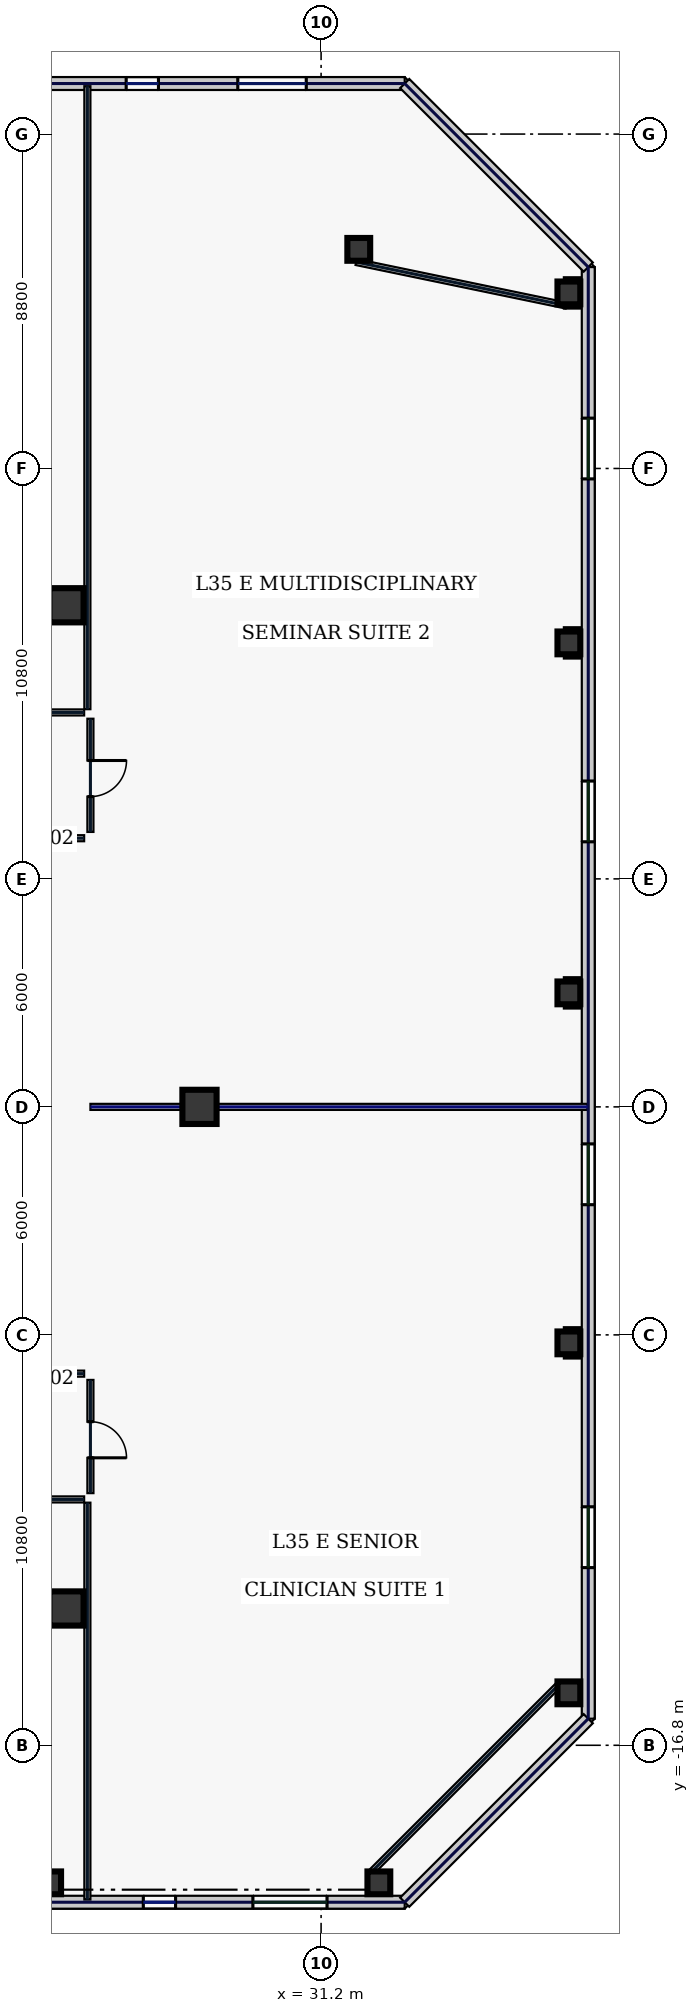
"""IFC4 building model, lengths in metres.
Left out: names, types, materials, properties, quantities, classifications, styles, units other than length and angle.
Written with IfcOpenShell. Run it as: python <this file> out.ifc"""

import sys

from ifc_helpers import new_model, si_unit, direction, frame, frame_2d, origin, origin_2d, place, context, subcontext, project, spatial, rectangle, hollow_rectangle, extrude, element, fill, save


model = new_model("IFC4")
c1 = context("Model", 3, precision=1e-05, world=origin(), true_north=direction((0.0, 1.0)))
c2 = subcontext(c1, "Body", "Model", "MODEL_VIEW")
j1 = project(units=[si_unit("LENGTHUNIT", "METRE"), si_unit("PLANEANGLEUNIT", "RADIAN")], contexts=[c1])
p1 = place(None, origin())
s1 = spatial("IfcSite", under=j1, at=p1, CompositionType="ELEMENT")
p2 = place(p1, origin())
s2 = spatial("IfcBuilding", under=s1, at=p2, CompositionType="ELEMENT")
p3 = place(p2, frame((0.0, 0.0, 156.2)))
s3 = spatial("IfcBuildingStorey", under=s2, at=p3, CompositionType="ELEMENT", Elevation=156.2)
for number, where, z_axis, x_axis in (
    (1, (24.5, -13.2, 0.0), (0.0, 0.0, 1.0), (1.0, 0.0, 0.0)),
    (2, (24.5, 13.2, 0.0), (0.0, 0.0, 1.0), (1.0, 0.0, 0.0)),
    (3, (28.0, 0.0, 0.0), (0.0, 0.0, 1.0), (1.0, 0.0, 0.0)),
):
    element("IfcColumn", number, at=place(p3, frame(where, z_axis=z_axis, x_axis=x_axis)), inside=s3, PredefinedType="COLUMN", context=c2, shape_type="SweptSolid", body=[
        extrude(hollow_rectangle(XDim=0.9, YDim=0.9, WallThickness=0.04, at=origin_2d()), origin(), (0.0, 0.0, 1.0), 3.74),
    ])
for number, where, z_axis, x_axis in (
    (4, (24.057, -20.42, 0.0), (0.0, 0.0, 1.0), (1.0, 0.0, 0.0)),
    (5, (32.72, -20.42, 0.0), (0.0, 0.0, 1.0), (1.0, 0.0, 0.0)),
    (6, (32.191, 22.566, 0.0), (0.0, 0.0, 1.0), (1.0, 0.0, 0.0)),
    (7, (37.72, -15.42, 0.0), (0.0, 0.0, 1.0), (1.0, 0.0, 0.0)),
    (8, (37.72, -6.21, 0.0), (0.0, 0.0, 1.0), (1.0, 0.0, 0.0)),
    (9, (37.72, 3.0, 0.0), (0.0, 0.0, 1.0), (1.0, 0.0, 0.0)),
    (10, (37.72, 12.21, 0.0), (0.0, 0.0, 1.0), (1.0, 0.0, 0.0)),
    (11, (37.72, 21.42, 0.0), (0.0, 0.0, 1.0), (1.0, 0.0, 0.0)),
):
    element("IfcColumn", number, at=place(p3, frame(where, z_axis=z_axis, x_axis=x_axis)), inside=s3, PredefinedType="COLUMN", context=c2, shape_type="SweptSolid", body=[
        extrude(hollow_rectangle(XDim=0.6, YDim=0.6, WallThickness=0.028, at=origin_2d()), origin(), (0.0, 0.0, 1.0), 3.74),
    ])
p4 = place(p3, frame((13.463, -20.93, 0.0), z_axis=(0.0, 0.0, 1.0), x_axis=(1.0, 0.0, 0.0)))
e12 = element("IfcWall", 12, at=p4, inside=s3, PredefinedType="STANDARD", context=c2, shape_type="SweptSolid", body=[
    extrude(rectangle(XDim=19.937, YDim=0.34, at=frame_2d((9.969, 0.0))), origin(), (0.0, 0.0, 1.0), 3.74),
])
p5 = place(p4, frame((3.295, 0.0, 0.8)))
e13 = element("IfcOpeningElement", 13, at=p5, cuts=e12, PredefinedType="OPENING", context=c2, shape_type="SweptSolid", body=[
    extrude(rectangle(XDim=1.95, YDim=2.1, at=frame_2d((0.975, 1.05))), frame((0.0, 0.18, 0.0), z_axis=(0.0, -1.0, 0.0), x_axis=(1.0, 0.0, 0.0)), (0.0, 0.0, 1.0), 0.36),
])
p6 = place(p4, frame((8.38, 0.0, 0.8)))
e14 = element("IfcOpeningElement", 14, at=p6, cuts=e12, PredefinedType="OPENING", context=c2, shape_type="SweptSolid", body=[
    extrude(rectangle(XDim=0.85, YDim=1.85, at=frame_2d((0.425, 0.925))), frame((0.0, 0.18, 0.0), z_axis=(0.0, -1.0, 0.0), x_axis=(1.0, 0.0, 0.0)), (0.0, 0.0, 1.0), 0.36),
])
p7 = place(p4, frame((13.058, 0.0, 0.8)))
e15 = element("IfcOpeningElement", 15, at=p7, cuts=e12, PredefinedType="OPENING", context=c2, shape_type="SweptSolid", body=[
    extrude(rectangle(XDim=0.85, YDim=1.85, at=frame_2d((0.425, 0.925))), frame((0.0, 0.18, 0.0), z_axis=(0.0, -1.0, 0.0), x_axis=(1.0, 0.0, 0.0)), (0.0, 0.0, 1.0), 0.36),
])
p8 = place(p4, frame((15.943, 0.0, 0.8)))
e16 = element("IfcOpeningElement", 16, at=p8, cuts=e12, PredefinedType="OPENING", context=c2, shape_type="SweptSolid", body=[
    extrude(rectangle(XDim=1.95, YDim=2.1, at=frame_2d((0.975, 1.05))), frame((0.0, 0.18, 0.0), z_axis=(0.0, -1.0, 0.0), x_axis=(1.0, 0.0, 0.0)), (0.0, 0.0, 1.0), 0.36),
])
p9 = place(p3, frame((33.4, 26.93, 0.0), z_axis=(0.0, 0.0, 1.0), x_axis=(-1.0, 0.0, 0.0)))
e17 = element("IfcWall", 17, at=p9, inside=s3, PredefinedType="STANDARD", context=c2, shape_type="SweptSolid", body=[
    extrude(rectangle(XDim=20.09, YDim=0.34, at=frame_2d((10.045, 0.0))), origin(), (0.0, 0.0, 1.0), 3.74),
])
p10 = place(p9, frame((15.005, 0.0, 0.7)))
e18 = element("IfcOpeningElement", 18, at=p10, cuts=e17, PredefinedType="OPENING", context=c2, shape_type="SweptSolid", body=[
    extrude(rectangle(XDim=1.8, YDim=2.2, at=frame_2d((0.9, 1.1))), frame((0.0, 0.18, 0.0), z_axis=(0.0, -1.0, 0.0), x_axis=(1.0, 0.0, 0.0)), (0.0, 0.0, 1.0), 0.36),
])
p11 = place(p9, frame((11.071, 0.0, 0.7)))
e19 = element("IfcOpeningElement", 19, at=p11, cuts=e17, PredefinedType="OPENING", context=c2, shape_type="SweptSolid", body=[
    extrude(rectangle(XDim=0.85, YDim=1.85, at=frame_2d((0.425, 0.925))), frame((0.0, 0.18, 0.0), z_axis=(0.0, -1.0, 0.0), x_axis=(1.0, 0.0, 0.0)), (0.0, 0.0, 1.0), 0.36),
])
p12 = place(p9, frame((6.48, 0.0, 0.7)))
e20 = element("IfcOpeningElement", 20, at=p12, cuts=e17, PredefinedType="OPENING", context=c2, shape_type="SweptSolid", body=[
    extrude(rectangle(XDim=0.85, YDim=1.85, at=frame_2d((0.425, 0.925))), frame((0.0, 0.18, 0.0), z_axis=(0.0, -1.0, 0.0), x_axis=(1.0, 0.0, 0.0)), (0.0, 0.0, 1.0), 0.36),
])
p13 = place(p9, frame((2.591, 0.0, 0.7)))
e21 = element("IfcOpeningElement", 21, at=p13, cuts=e17, PredefinedType="OPENING", context=c2, shape_type="SweptSolid", body=[
    extrude(rectangle(XDim=1.8, YDim=2.2, at=frame_2d((0.9, 1.1))), frame((0.0, 0.18, 0.0), z_axis=(0.0, -1.0, 0.0), x_axis=(1.0, 0.0, 0.0)), (0.0, 0.0, 1.0), 0.36),
])
p14 = place(p3, frame((38.23, -16.1, 0.0), z_axis=(0.0, 0.0, 1.0), x_axis=(0.0, 1.0, 0.0)))
e22 = element("IfcWall", 22, at=p14, inside=s3, PredefinedType="STANDARD", context=c2, shape_type="SweptSolid", body=[
    extrude(rectangle(XDim=38.2, YDim=0.34, at=frame_2d((19.1, 0.0))), origin(), (0.0, 0.0, 1.0), 3.74),
])
p15 = place(p14, frame((3.975, 0.0, 0.58)))
e23 = element("IfcOpeningElement", 23, at=p15, cuts=e22, PredefinedType="OPENING", context=c2, shape_type="SweptSolid", body=[
    extrude(rectangle(XDim=1.6, YDim=2.3, at=frame_2d((0.8, 1.15))), frame((0.0, 0.18, 0.0), z_axis=(0.0, -1.0, 0.0), x_axis=(1.0, 0.0, 0.0)), (0.0, 0.0, 1.0), 0.36),
])
p16 = place(p14, frame((13.525, 0.0, 0.58)))
e24 = element("IfcOpeningElement", 24, at=p16, cuts=e22, PredefinedType="OPENING", context=c2, shape_type="SweptSolid", body=[
    extrude(rectangle(XDim=1.6, YDim=2.3, at=frame_2d((0.8, 1.15))), frame((0.0, 0.18, 0.0), z_axis=(0.0, -1.0, 0.0), x_axis=(1.0, 0.0, 0.0)), (0.0, 0.0, 1.0), 0.36),
])
p17 = place(p14, frame((23.075, 0.0, 0.58)))
e25 = element("IfcOpeningElement", 25, at=p17, cuts=e22, PredefinedType="OPENING", context=c2, shape_type="SweptSolid", body=[
    extrude(rectangle(XDim=1.6, YDim=2.3, at=frame_2d((0.8, 1.15))), frame((0.0, 0.18, 0.0), z_axis=(0.0, -1.0, 0.0), x_axis=(1.0, 0.0, 0.0)), (0.0, 0.0, 1.0), 0.36),
])
p18 = place(p14, frame((32.625, 0.0, 0.58)))
e26 = element("IfcOpeningElement", 26, at=p18, cuts=e22, PredefinedType="OPENING", context=c2, shape_type="SweptSolid", body=[
    extrude(rectangle(XDim=1.6, YDim=2.3, at=frame_2d((0.8, 1.15))), frame((0.0, 0.18, 0.0), z_axis=(0.0, -1.0, 0.0), x_axis=(1.0, 0.0, 0.0)), (0.0, 0.0, 1.0), 0.36),
])
for number, where, z_axis, x_axis in (
    (27, (33.4, -20.93, 0.0), (0.0, 0.0, 1.0), (0.707, 0.707, 0.0)),
    (28, (38.23, 22.1, 0.0), (0.0, 0.0, 1.0), (-0.707, 0.707, 0.0)),
):
    element("IfcWall", number, at=place(p3, frame(where, z_axis=z_axis, x_axis=x_axis)), inside=s3, PredefinedType="STANDARD", context=c2, shape_type="SweptSolid", body=[
        extrude(rectangle(XDim=6.831, YDim=0.34, at=frame_2d((3.415, 0.0))), origin(), (0.0, 0.0, 1.0), 3.74),
    ])
p19 = place(p3, frame((32.479, -20.18, 0.0), z_axis=(0.0, 0.0, 1.0), x_axis=(0.707106781187, 0.707106781187, 0.0)))
e29 = element("IfcWall", 29, at=p19, inside=s3, PredefinedType="PARTITIONING", context=c2, shape_type="SweptSolid", body=[
    extrude(rectangle(XDim=7.071, YDim=0.16, at=frame_2d((3.536, 0.0))), origin(), (0.0, 0.0, 1.0), 3.74),
])
p20 = place(p3, frame((37.651, 21.087, 0.0), z_axis=(0.0, 0.0, 1.0), x_axis=(-0.979184618318, 0.202971631636, 0.0)))
e30 = element("IfcWall", 30, at=p20, inside=s3, PredefinedType="PARTITIONING", context=c2, shape_type="SweptSolid", body=[
    extrude(rectangle(XDim=5.646, YDim=0.16, at=frame_2d((2.823, 0.0))), origin(), (0.0, 0.0, 1.0), 3.74),
])
p21 = place(p3, frame((-24.965, 10.38, 0.0), z_axis=(0.0, 0.0, 1.0), x_axis=(1.0, 0.0, 0.0)))
e31 = element("IfcWall", 31, at=p21, inside=s3, PredefinedType="PARTITIONING", context=c2, shape_type="SweptSolid", body=[
    extrude(rectangle(XDim=49.93, YDim=0.16, at=frame_2d((24.965, 0.0))), origin(), (0.0, 0.0, 1.0), 3.74),
])
p22 = place(p21, frame((2.406, 0.0, 0.0)))
e32 = element("IfcOpeningElement", 32, at=p22, cuts=e31, PredefinedType="OPENING", context=c2, shape_type="SweptSolid", body=[
    extrude(rectangle(XDim=1.05, YDim=2.2, at=frame_2d((0.525, 1.1))), frame((0.0, 0.09, 0.0), z_axis=(0.0, -1.0, 0.0), x_axis=(1.0, 0.0, 0.0)), (0.0, 0.0, 1.0), 0.18),
])
p23 = place(p21, frame((7.137, 0.0, 0.0)))
e33 = element("IfcOpeningElement", 33, at=p23, cuts=e31, PredefinedType="OPENING", context=c2, shape_type="SweptSolid", body=[
    extrude(rectangle(XDim=0.95, YDim=2.2, at=frame_2d((0.475, 1.1))), frame((0.0, 0.09, 0.0), z_axis=(0.0, -1.0, 0.0), x_axis=(1.0, 0.0, 0.0)), (0.0, 0.0, 1.0), 0.18),
])
p24 = place(p21, frame((17.18, 0.0, 0.0)))
e34 = element("IfcOpeningElement", 34, at=p24, cuts=e31, PredefinedType="OPENING", context=c2, shape_type="SweptSolid", body=[
    extrude(rectangle(XDim=0.95, YDim=2.2, at=frame_2d((0.475, 1.1))), frame((0.0, 0.09, 0.0), z_axis=(0.0, -1.0, 0.0), x_axis=(1.0, 0.0, 0.0)), (0.0, 0.0, 1.0), 0.18),
])
p25 = place(p21, frame((32.34, 0.0, 0.0)))
e35 = element("IfcOpeningElement", 35, at=p25, cuts=e31, PredefinedType="OPENING", context=c2, shape_type="SweptSolid", body=[
    extrude(rectangle(XDim=0.95, YDim=2.2, at=frame_2d((0.475, 1.1))), frame((0.0, 0.09, 0.0), z_axis=(0.0, -1.0, 0.0), x_axis=(1.0, 0.0, 0.0)), (0.0, 0.0, 1.0), 0.18),
])
p26 = place(p21, frame((42.403, 0.0, 0.0)))
e36 = element("IfcOpeningElement", 36, at=p26, cuts=e31, PredefinedType="OPENING", context=c2, shape_type="SweptSolid", body=[
    extrude(rectangle(XDim=0.95, YDim=2.2, at=frame_2d((0.475, 1.1))), frame((0.0, 0.09, 0.0), z_axis=(0.0, -1.0, 0.0), x_axis=(1.0, 0.0, 0.0)), (0.0, 0.0, 1.0), 0.18),
])
p27 = place(p21, frame((47.173, 0.0, 0.0)))
e37 = element("IfcOpeningElement", 37, at=p27, cuts=e31, PredefinedType="OPENING", context=c2, shape_type="SweptSolid", body=[
    extrude(rectangle(XDim=1.05, YDim=2.2, at=frame_2d((0.525, 1.1))), frame((0.0, 0.09, 0.0), z_axis=(0.0, -1.0, 0.0), x_axis=(1.0, 0.0, 0.0)), (0.0, 0.0, 1.0), 0.18),
])
p28 = place(p3, frame((25.13, 10.215, 0.0), z_axis=(0.0, 0.0, 1.0), x_axis=(0.0, -1.0, 0.0)))
e38 = element("IfcWall", 38, at=p28, inside=s3, PredefinedType="PARTITIONING", context=c2, shape_type="SweptSolid", body=[
    extrude(rectangle(XDim=2.98, YDim=0.16, at=frame_2d((1.49, 0.0))), origin(), (0.0, 0.0, 1.0), 3.74),
])
p29 = place(p28, frame((1.1, 0.0, 0.0)))
e39 = element("IfcOpeningElement", 39, at=p29, cuts=e38, PredefinedType="OPENING", context=c2, shape_type="SweptSolid", body=[
    extrude(rectangle(XDim=0.95, YDim=2.2, at=frame_2d((0.475, 1.1))), frame((0.0, 0.09, 0.0), z_axis=(0.0, -1.0, 0.0), x_axis=(1.0, 0.0, 0.0)), (0.0, 0.0, 1.0), 0.18),
])
for number, where, z_axis, x_axis in (
    (40, (24.965, 7.07, 0.0), (0.0, 0.0, 1.0), (-1.0, 0.0, 0.0)),
    (41, (10.715, -7.02, 0.0), (0.0, 0.0, 1.0), (1.0, 0.0, 0.0)),
):
    element("IfcWall", number, at=place(p3, frame(where, z_axis=z_axis, x_axis=x_axis)), inside=s3, PredefinedType="PARTITIONING", context=c2, shape_type="SweptSolid", body=[
        extrude(rectangle(XDim=14.25, YDim=0.16, at=frame_2d((7.125, 0.0))), origin(), (0.0, 0.0, 1.0), 3.74),
    ])
p30 = place(p3, frame((25.13, -7.185, 0.0), z_axis=(0.0, 0.0, 1.0), x_axis=(0.0, -1.0, 0.0)))
e42 = element("IfcWall", 42, at=p30, inside=s3, PredefinedType="PARTITIONING", context=c2, shape_type="SweptSolid", body=[
    extrude(rectangle(XDim=2.98, YDim=0.16, at=frame_2d((1.49, 0.0))), origin(), (0.0, 0.0, 1.0), 3.74),
])
p31 = place(p30, frame((1.1, 0.0, 0.0)))
e43 = element("IfcOpeningElement", 43, at=p31, cuts=e42, PredefinedType="OPENING", context=c2, shape_type="SweptSolid", body=[
    extrude(rectangle(XDim=0.95, YDim=2.2, at=frame_2d((0.475, 1.1))), frame((0.0, 0.09, 0.0), z_axis=(0.0, -1.0, 0.0), x_axis=(1.0, 0.0, 0.0)), (0.0, 0.0, 1.0), 0.18),
])
p32 = place(p3, frame((24.965, -10.33, 0.0), z_axis=(0.0, 0.0, 1.0), x_axis=(-1.0, 0.0, 0.0)))
e44 = element("IfcWall", 44, at=p32, inside=s3, PredefinedType="PARTITIONING", context=c2, shape_type="SweptSolid", body=[
    extrude(rectangle(XDim=49.93, YDim=0.16, at=frame_2d((24.965, 0.0))), origin(), (0.0, 0.0, 1.0), 3.74),
])
p33 = place(p32, frame((47.106, 0.0, 0.0)))
e45 = element("IfcOpeningElement", 45, at=p33, cuts=e44, PredefinedType="OPENING", context=c2, shape_type="SweptSolid", body=[
    extrude(rectangle(XDim=1.15, YDim=2.2, at=frame_2d((0.575, 1.1))), frame((0.0, 0.09, 0.0), z_axis=(0.0, -1.0, 0.0), x_axis=(1.0, 0.0, 0.0)), (0.0, 0.0, 1.0), 0.18),
])
p34 = place(p32, frame((41.6, 0.0, 0.0)))
e46 = element("IfcOpeningElement", 46, at=p34, cuts=e44, PredefinedType="OPENING", context=c2, shape_type="SweptSolid", body=[
    extrude(rectangle(XDim=0.95, YDim=2.2, at=frame_2d((0.475, 1.1))), frame((0.0, 0.09, 0.0), z_axis=(0.0, -1.0, 0.0), x_axis=(1.0, 0.0, 0.0)), (0.0, 0.0, 1.0), 0.18),
])
p35 = place(p32, frame((32.4, 0.0, 0.0)))
e47 = element("IfcOpeningElement", 47, at=p35, cuts=e44, PredefinedType="OPENING", context=c2, shape_type="SweptSolid", body=[
    extrude(rectangle(XDim=0.95, YDim=2.2, at=frame_2d((0.475, 1.1))), frame((0.0, 0.09, 0.0), z_axis=(0.0, -1.0, 0.0), x_axis=(1.0, 0.0, 0.0)), (0.0, 0.0, 1.0), 0.18),
])
p36 = place(p32, frame((22.475, 0.0, 0.0)))
e48 = element("IfcOpeningElement", 48, at=p36, cuts=e44, PredefinedType="OPENING", context=c2, shape_type="SweptSolid", body=[
    extrude(rectangle(XDim=0.95, YDim=2.2, at=frame_2d((0.475, 1.1))), frame((0.0, 0.09, 0.0), z_axis=(0.0, -1.0, 0.0), x_axis=(1.0, 0.0, 0.0)), (0.0, 0.0, 1.0), 0.18),
])
p37 = place(p32, frame((14.375, 0.0, 0.0)))
e49 = element("IfcOpeningElement", 49, at=p37, cuts=e44, PredefinedType="OPENING", context=c2, shape_type="SweptSolid", body=[
    extrude(rectangle(XDim=1.05, YDim=2.2, at=frame_2d((0.525, 1.1))), frame((0.0, 0.09, 0.0), z_axis=(0.0, -1.0, 0.0), x_axis=(1.0, 0.0, 0.0)), (0.0, 0.0, 1.0), 0.18),
])
p38 = place(p32, frame((7.275, 0.0, 0.0)))
e50 = element("IfcOpeningElement", 50, at=p38, cuts=e44, PredefinedType="OPENING", context=c2, shape_type="SweptSolid", body=[
    extrude(rectangle(XDim=0.95, YDim=2.2, at=frame_2d((0.475, 1.1))), frame((0.0, 0.09, 0.0), z_axis=(0.0, -1.0, 0.0), x_axis=(1.0, 0.0, 0.0)), (0.0, 0.0, 1.0), 0.18),
])
p39 = place(p32, frame((2.044, 0.0, 0.0)))
e51 = element("IfcOpeningElement", 51, at=p39, cuts=e44, PredefinedType="OPENING", context=c2, shape_type="SweptSolid", body=[
    extrude(rectangle(XDim=0.95, YDim=2.2, at=frame_2d((0.475, 1.1))), frame((0.0, 0.09, 0.0), z_axis=(0.0, -1.0, 0.0), x_axis=(1.0, 0.0, 0.0)), (0.0, 0.0, 1.0), 0.18),
])
p40 = place(p3, frame((25.05, 10.465, 0.0), z_axis=(0.0, 0.0, 1.0), x_axis=(0.0, 1.0, 0.0)))
e52 = element("IfcWall", 52, at=p40, inside=s3, PredefinedType="PARTITIONING", context=c2, shape_type="SweptSolid", body=[
    extrude(rectangle(XDim=16.395, YDim=0.16, at=frame_2d((8.198, 0.0))), origin(), (0.0, 0.0, 1.0), 3.74),
])
p41 = place(p3, frame((25.05, -20.86, 0.0), z_axis=(0.0, 0.0, 1.0), x_axis=(0.0, 1.0, 0.0)))
e53 = element("IfcWall", 53, at=p41, inside=s3, PredefinedType="PARTITIONING", context=c2, shape_type="SweptSolid", body=[
    extrude(rectangle(XDim=10.445, YDim=0.16, at=frame_2d((5.223, 0.0))), origin(), (0.0, 0.0, 1.0), 3.74),
])
p42 = place(p3, frame((25.13, 0.0, 0.0), z_axis=(0.0, 0.0, 1.0), x_axis=(1.0, 0.0, 0.0)))
e54 = element("IfcWall", 54, at=p42, inside=s3, PredefinedType="PARTITIONING", context=c2, shape_type="SweptSolid", body=[
    extrude(rectangle(XDim=13.08, YDim=0.16, at=frame_2d((6.54, 0.0))), origin(), (0.0, 0.0, 1.0), 3.285),
])
p43 = place(p7, origin())
e55 = element("IfcWindow", 55, at=p43, inside=s3, PartitioningType="SINGLE_PANEL", PredefinedType="WINDOW", context=c2, shape_type="SweptSolid", body=[
    extrude(rectangle(XDim=0.85, YDim=1.85, at=frame_2d((0.425, 0.925))), frame((0.0, 0.03, 0.0), z_axis=(0.0, -1.0, 0.0), x_axis=(1.0, 0.0, 0.0)), (0.0, 0.0, 1.0), 0.06),
])
fill(e15, e55)
p44 = place(p8, origin())
e56 = element("IfcWindow", 56, at=p44, inside=s3, PartitioningType="SINGLE_PANEL", PredefinedType="WINDOW", context=c2, shape_type="SweptSolid", body=[
    extrude(rectangle(XDim=1.95, YDim=2.1, at=frame_2d((0.975, 1.05))), frame((0.0, 0.03, 0.0), z_axis=(0.0, -1.0, 0.0), x_axis=(1.0, 0.0, 0.0)), (0.0, 0.0, 1.0), 0.06),
])
fill(e16, e56)
p45 = place(p12, origin())
e57 = element("IfcWindow", 57, at=p45, inside=s3, PartitioningType="SINGLE_PANEL", PredefinedType="WINDOW", context=c2, shape_type="SweptSolid", body=[
    extrude(rectangle(XDim=0.85, YDim=1.85, at=frame_2d((0.425, 0.925))), frame((0.0, 0.03, 0.0), z_axis=(0.0, -1.0, 0.0), x_axis=(1.0, 0.0, 0.0)), (0.0, 0.0, 1.0), 0.06),
])
fill(e20, e57)
p46 = place(p13, origin())
e58 = element("IfcWindow", 58, at=p46, inside=s3, PartitioningType="SINGLE_PANEL", PredefinedType="WINDOW", context=c2, shape_type="SweptSolid", body=[
    extrude(rectangle(XDim=1.8, YDim=2.2, at=frame_2d((0.9, 1.1))), frame((0.0, 0.03, 0.0), z_axis=(0.0, -1.0, 0.0), x_axis=(1.0, 0.0, 0.0)), (0.0, 0.0, 1.0), 0.06),
])
fill(e21, e58)
p47 = place(p15, origin())
e59 = element("IfcWindow", 59, at=p47, inside=s3, PartitioningType="SINGLE_PANEL", PredefinedType="WINDOW", context=c2, shape_type="SweptSolid", body=[
    extrude(rectangle(XDim=1.6, YDim=2.3, at=frame_2d((0.8, 1.15))), frame((0.0, 0.03, 0.0), z_axis=(0.0, -1.0, 0.0), x_axis=(1.0, 0.0, 0.0)), (0.0, 0.0, 1.0), 0.06),
])
fill(e23, e59)
p48 = place(p16, origin())
e60 = element("IfcWindow", 60, at=p48, inside=s3, PartitioningType="SINGLE_PANEL", PredefinedType="WINDOW", context=c2, shape_type="SweptSolid", body=[
    extrude(rectangle(XDim=1.6, YDim=2.3, at=frame_2d((0.8, 1.15))), frame((0.0, 0.03, 0.0), z_axis=(0.0, -1.0, 0.0), x_axis=(1.0, 0.0, 0.0)), (0.0, 0.0, 1.0), 0.06),
])
fill(e24, e60)
p49 = place(p17, origin())
e61 = element("IfcWindow", 61, at=p49, inside=s3, PartitioningType="SINGLE_PANEL", PredefinedType="WINDOW", context=c2, shape_type="SweptSolid", body=[
    extrude(rectangle(XDim=1.6, YDim=2.3, at=frame_2d((0.8, 1.15))), frame((0.0, 0.03, 0.0), z_axis=(0.0, -1.0, 0.0), x_axis=(1.0, 0.0, 0.0)), (0.0, 0.0, 1.0), 0.06),
])
fill(e25, e61)
p50 = place(p18, origin())
e62 = element("IfcWindow", 62, at=p50, inside=s3, PartitioningType="SINGLE_PANEL", PredefinedType="WINDOW", context=c2, shape_type="SweptSolid", body=[
    extrude(rectangle(XDim=1.6, YDim=2.3, at=frame_2d((0.8, 1.15))), frame((0.0, 0.03, 0.0), z_axis=(0.0, -1.0, 0.0), x_axis=(1.0, 0.0, 0.0)), (0.0, 0.0, 1.0), 0.06),
])
fill(e26, e62)
p51 = place(p31, origin())
e63 = element("IfcDoor", 63, at=p51, inside=s3, OperationType="SINGLE_SWING_RIGHT", PredefinedType="DOOR", context=c2, shape_type="SweptSolid", body=[
    extrude(rectangle(XDim=0.95, YDim=2.2, at=frame_2d((0.475, 1.1))), frame((0.0, 0.025, 0.0), z_axis=(0.0, -1.0, 0.0), x_axis=(1.0, 0.0, 0.0)), (0.0, 0.0, 1.0), 0.05),
])
fill(e43, e63)
p52 = place(p29, origin())
e64 = element("IfcDoor", 64, at=p52, inside=s3, OperationType="SINGLE_SWING_LEFT", PredefinedType="DOOR", context=c2, shape_type="SweptSolid", body=[
    extrude(rectangle(XDim=0.95, YDim=2.2, at=frame_2d((0.475, 1.1))), frame((0.0, 0.025, 0.0), z_axis=(0.0, -1.0, 0.0), x_axis=(1.0, 0.0, 0.0)), (0.0, 0.0, 1.0), 0.05),
])
fill(e39, e64)
save(model, sys.argv[1])
